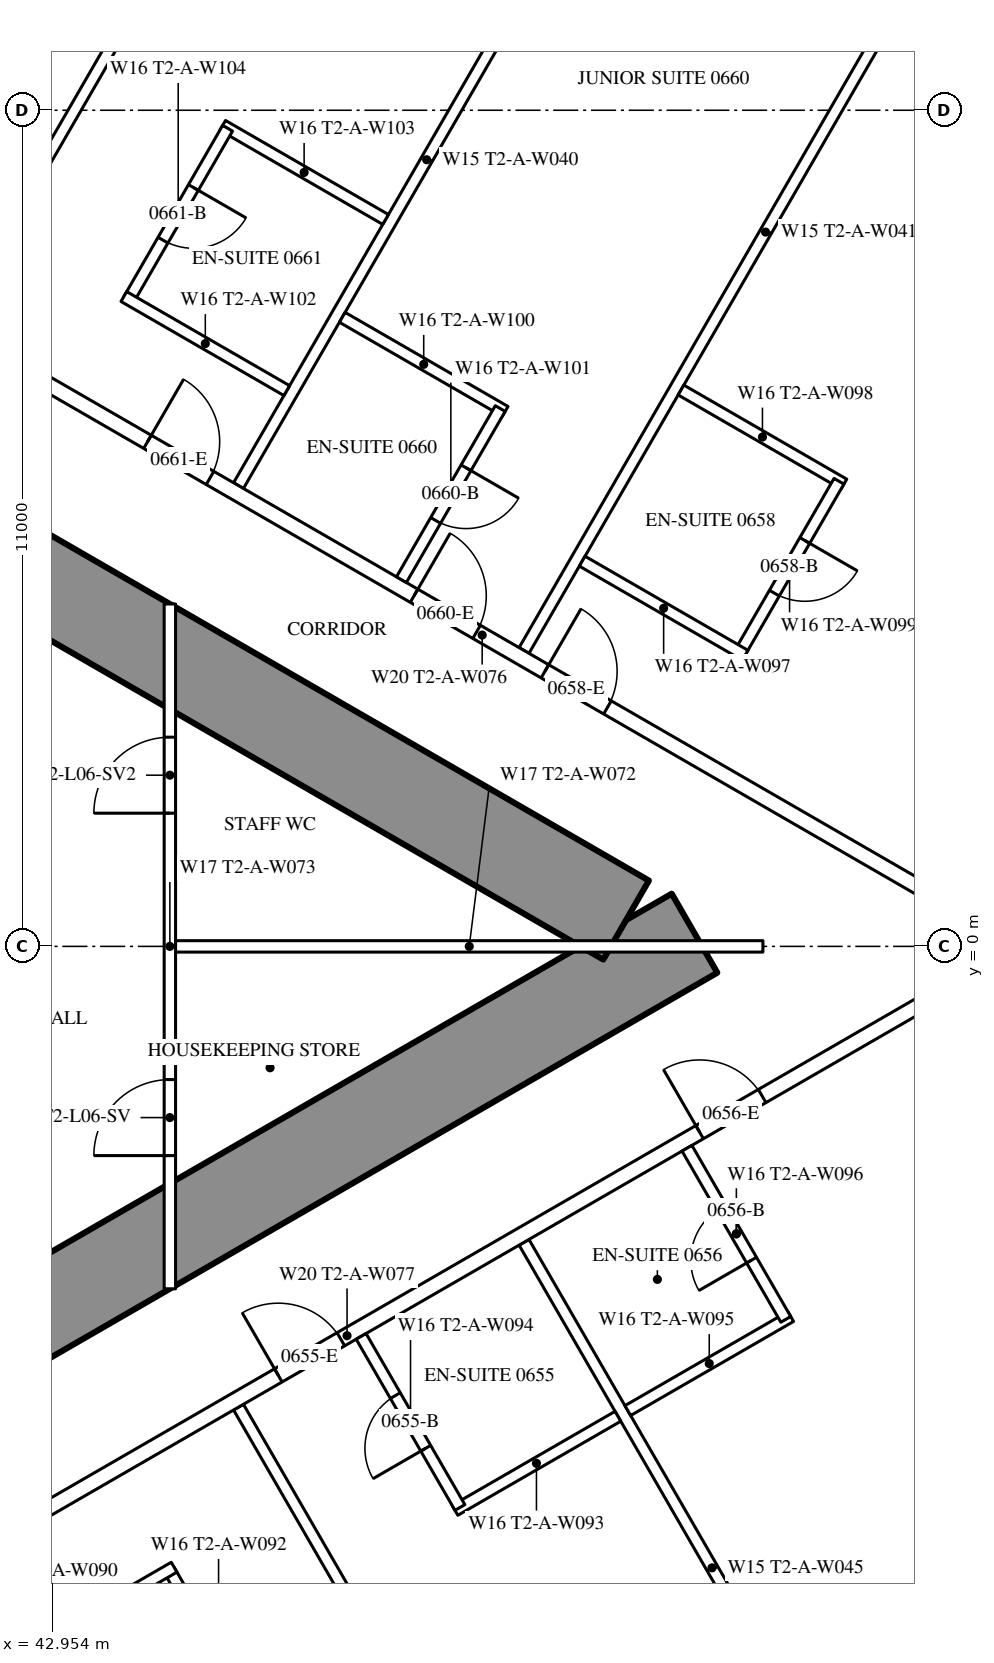
"""IFC4 building model, lengths in metres.
Left out: names, types, materials, properties, quantities, classifications, styles, units other than length and angle.
Written with IfcOpenShell. Run it as: python <this file> out.ifc"""

import sys

from ifc_helpers import new_model, si_unit, direction, frame, frame_2d, origin, place, context, subcontext, project, spatial, rectangle, extrude, element, fill, save


model = new_model("IFC4")
c1 = context("Model", 3, precision=1e-05, world=origin(), true_north=direction((0.0, 1.0)))
c2 = subcontext(c1, "Body", "Model", "MODEL_VIEW")
j1 = project(units=[si_unit("LENGTHUNIT", "METRE"), si_unit("PLANEANGLEUNIT", "RADIAN")], contexts=[c1])
p1 = place(None, origin())
s1 = spatial("IfcSite", under=j1, at=p1, CompositionType="ELEMENT")
p2 = place(p1, origin())
s2 = spatial("IfcBuilding", under=s1, at=p2, CompositionType="ELEMENT")
p3 = place(p2, frame((0.0, 0.0, 28.5)))
s3 = spatial("IfcBuildingStorey", under=s2, at=p3, CompositionType="ELEMENT", Elevation=28.5)
p4 = place(p3, frame((27.2, -13.8, 0.0), z_axis=(0.0, 0.0, 1.0), x_axis=(0.866027159892, 0.499996958321, 0.0)))
e1 = element("IfcWall", 1, at=p4, inside=s3, PredefinedType="SHEAR", context=c2, shape_type="SweptSolid", body=[
    extrude(rectangle(XDim=27.947, YDim=1.2, at=frame_2d((13.973, 0.0))), origin(), (0.0, 0.0, 1.0), 3.5),
])
p5 = place(p4, frame((4.6, 0.0, 0.0)))
e2 = element("IfcOpeningElement", 2, at=p5, cuts=e1, PredefinedType="OPENING", context=c2, shape_type="SweptSolid", body=[
    extrude(rectangle(XDim=1.0, YDim=2.2, at=frame_2d((0.5, 1.1))), frame((0.0, 0.61, 0.0), z_axis=(0.0, -1.0, 0.0), x_axis=(1.0, 0.0, 0.0)), (0.0, 0.0, 1.0), 1.22),
])
p6 = place(p4, frame((13.395, 0.0, 0.0)))
e3 = element("IfcOpeningElement", 3, at=p6, cuts=e1, PredefinedType="OPENING", context=c2, shape_type="SweptSolid", body=[
    extrude(rectangle(XDim=1.8, YDim=2.2, at=frame_2d((0.9, 1.1))), frame((0.0, 0.61, 0.0), z_axis=(0.0, -1.0, 0.0), x_axis=(1.0, 0.0, 0.0)), (0.0, 0.0, 1.0), 1.22),
])
p7 = place(p3, frame((27.2, 13.8, 0.0), z_axis=(0.0, 0.0, 1.0), x_axis=(0.866024515034, -0.500001539357, 0.0)))
e4 = element("IfcWall", 4, at=p7, inside=s3, PredefinedType="SHEAR", context=c2, shape_type="SweptSolid", body=[
    extrude(rectangle(XDim=26.907, YDim=1.2, at=frame_2d((13.454, 0.0))), origin(), (0.0, 0.0, 1.0), 3.5),
])
p8 = place(p7, frame((4.6, 0.0, 0.0)))
e5 = element("IfcOpeningElement", 5, at=p8, cuts=e4, PredefinedType="OPENING", context=c2, shape_type="SweptSolid", body=[
    extrude(rectangle(XDim=1.0, YDim=2.2, at=frame_2d((0.5, 1.1))), frame((0.0, 0.61, 0.0), z_axis=(0.0, -1.0, 0.0), x_axis=(1.0, 0.0, 0.0)), (0.0, 0.0, 1.0), 1.22),
])
p9 = place(p7, frame((13.395, 0.0, 0.0)))
e6 = element("IfcOpeningElement", 6, at=p9, cuts=e4, PredefinedType="OPENING", context=c2, shape_type="SweptSolid", body=[
    extrude(rectangle(XDim=1.8, YDim=2.2, at=frame_2d((0.9, 1.1))), frame((0.0, 0.61, 0.0), z_axis=(0.0, -1.0, 0.0), x_axis=(1.0, 0.0, 0.0)), (0.0, 0.0, 1.0), 1.22),
])
p10 = place(p3, frame((41.647, -8.23, 0.0), z_axis=(0.0, 0.0, 1.0), x_axis=(0.49998590462, -0.866033541603, 0.0)))
e7 = element("IfcWall", 7, at=p10, inside=s3, PredefinedType="PARTITIONING", context=c2, shape_type="SweptSolid", body=[
    extrude(rectangle(XDim=12.621, YDim=0.15, at=frame_2d((6.311, 0.0))), origin(), (0.0, 0.0, 1.0), 3.25),
])
p11 = place(p3, frame((45.403, -6.062, 0.0), z_axis=(0.0, 0.0, 1.0), x_axis=(0.500007077968, -0.866021317279, 0.0)))
e8 = element("IfcWall", 8, at=p11, inside=s3, PredefinedType="PARTITIONING", context=c2, shape_type="SweptSolid", body=[
    extrude(rectangle(XDim=12.721, YDim=0.15, at=frame_2d((6.361, 0.0))), origin(), (0.0, 0.0, 1.0), 3.25),
])
p12 = place(p3, frame((49.159, -3.893, 0.0), z_axis=(0.0, 0.0, 1.0), x_axis=(0.499998773722, -0.866026111775, 0.0)))
e9 = element("IfcWall", 9, at=p12, inside=s3, PredefinedType="PARTITIONING", context=c2, shape_type="SweptSolid", body=[
    extrude(rectangle(XDim=9.892, YDim=0.15, at=frame_2d((4.946, 0.0))), origin(), (0.0, 0.0, 1.0), 2.25),
])
p13 = place(p3, frame((41.647, 8.23, 0.0), z_axis=(0.0, 0.0, 1.0), x_axis=(0.49998590462, 0.866033541603, 0.0)))
e10 = element("IfcWall", 10, at=p13, inside=s3, PredefinedType="PARTITIONING", context=c2, shape_type="SweptSolid", body=[
    extrude(rectangle(XDim=12.621, YDim=0.15, at=frame_2d((6.311, 0.0))), origin(), (0.0, 0.0, 1.0), 3.25),
])
p14 = place(p3, frame((45.403, 6.062, 0.0), z_axis=(0.0, 0.0, 1.0), x_axis=(0.500013434677, 0.866017647131, 0.0)))
e11 = element("IfcWall", 11, at=p14, inside=s3, PredefinedType="PARTITIONING", context=c2, shape_type="SweptSolid", body=[
    extrude(rectangle(XDim=9.902, YDim=0.15, at=frame_2d((4.951, 0.0))), origin(), (0.0, 0.0, 1.0), 2.25),
])
p15 = place(p3, frame((49.159, 3.893, 0.0), z_axis=(0.0, 0.0, 1.0), x_axis=(0.499995664361, 0.866027906952, 0.0)))
e12 = element("IfcWall", 12, at=p15, inside=s3, PredefinedType="PARTITIONING", context=c2, shape_type="SweptSolid", body=[
    extrude(rectangle(XDim=12.711, YDim=0.15, at=frame_2d((6.356, 0.0))), origin(), (0.0, 0.0, 1.0), 3.25),
])
p16 = place(p3, frame((37.96, -10.243, 0.0), z_axis=(0.0, 0.0, 1.0), x_axis=(0.866026429433, 0.499998223521, 0.0)))
e13 = element("IfcWall", 13, at=p16, inside=s3, PredefinedType="PARTITIONING", context=c2, shape_type="SweptSolid", body=[
    extrude(rectangle(XDim=20.487, YDim=0.2, at=frame_2d((10.243, 0.0))), origin(), (0.0, 0.0, 1.0), 3.25),
])
p17 = place(p16, frame((4.575, 0.0, 0.0)))
e14 = element("IfcOpeningElement", 14, at=p17, cuts=e13, PredefinedType="OPENING", context=c2, shape_type="SweptSolid", body=[
    extrude(rectangle(XDim=0.95, YDim=2.2, at=frame_2d((0.475, 1.1))), frame((0.0, 0.11, 0.0), z_axis=(0.0, -1.0, 0.0), x_axis=(1.0, 0.0, 0.0)), (0.0, 0.0, 1.0), 0.22),
])
p18 = place(p16, frame((9.199, 0.0, 0.0)))
e15 = element("IfcOpeningElement", 15, at=p18, cuts=e13, PredefinedType="OPENING", context=c2, shape_type="SweptSolid", body=[
    extrude(rectangle(XDim=0.95, YDim=2.2, at=frame_2d((0.475, 1.1))), frame((0.0, 0.11, 0.0), z_axis=(0.0, -1.0, 0.0), x_axis=(1.0, 0.0, 0.0)), (0.0, 0.0, 1.0), 0.22),
])
p19 = place(p16, frame((15.599, 0.0, 0.0)))
e16 = element("IfcOpeningElement", 16, at=p19, cuts=e13, PredefinedType="OPENING", context=c2, shape_type="SweptSolid", body=[
    extrude(rectangle(XDim=0.95, YDim=2.2, at=frame_2d((0.475, 1.1))), frame((0.0, 0.11, 0.0), z_axis=(0.0, -1.0, 0.0), x_axis=(1.0, 0.0, 0.0)), (0.0, 0.0, 1.0), 0.22),
])
p20 = place(p16, frame((2.875, 0.0, 0.0)))
e17 = element("IfcOpeningElement", 17, at=p20, cuts=e13, PredefinedType="OPENING", context=c2, shape_type="SweptSolid", body=[
    extrude(rectangle(XDim=0.95, YDim=2.2, at=frame_2d((0.475, 1.1))), frame((0.0, 0.11, 0.0), z_axis=(0.0, -1.0, 0.0), x_axis=(1.0, 0.0, 0.0)), (0.0, 0.0, 1.0), 0.22),
])
p21 = place(p3, frame((41.619, 8.131, 0.0), z_axis=(0.0, 0.0, 1.0), x_axis=(0.86603245327, -0.499987789734, 0.0)))
e18 = element("IfcWall", 18, at=p21, inside=s3, PredefinedType="PARTITIONING", context=c2, shape_type="SweptSolid", body=[
    extrude(rectangle(XDim=16.142, YDim=0.2, at=frame_2d((8.071, 0.0))), origin(), (0.0, 0.0, 1.0), 3.25),
])
p22 = place(p21, frame((9.024, 0.0, 0.0)))
e19 = element("IfcOpeningElement", 19, at=p22, cuts=e18, PredefinedType="OPENING", context=c2, shape_type="SweptSolid", body=[
    extrude(rectangle(XDim=0.95, YDim=2.2, at=frame_2d((0.475, 1.1))), frame((0.0, 0.11, 0.0), z_axis=(0.0, -1.0, 0.0), x_axis=(1.0, 0.0, 0.0)), (0.0, 0.0, 1.0), 0.22),
])
p23 = place(p21, frame((7.037, 0.0, 0.0)))
e20 = element("IfcOpeningElement", 20, at=p23, cuts=e18, PredefinedType="OPENING", context=c2, shape_type="SweptSolid", body=[
    extrude(rectangle(XDim=0.95, YDim=2.2, at=frame_2d((0.475, 1.1))), frame((0.0, 0.11, 0.0), z_axis=(0.0, -1.0, 0.0), x_axis=(1.0, 0.0, 0.0)), (0.0, 0.0, 1.0), 0.22),
])
p24 = place(p21, frame((2.987, 0.0, 0.0)))
e21 = element("IfcOpeningElement", 21, at=p24, cuts=e18, PredefinedType="OPENING", context=c2, shape_type="SweptSolid", body=[
    extrude(rectangle(XDim=0.95, YDim=2.2, at=frame_2d((0.475, 1.1))), frame((0.0, 0.11, 0.0), z_axis=(0.0, -1.0, 0.0), x_axis=(1.0, 0.0, 0.0)), (0.0, 0.0, 1.0), 0.22),
])
p25 = place(p3, frame((44.491, -8.205, 0.0), z_axis=(0.0, 0.0, 1.0), x_axis=(0.500047596559, -0.865997922154, 0.0)))
e22 = element("IfcWall", 22, at=p25, inside=s3, PredefinedType="PARTITIONING", context=c2, shape_type="SweptSolid", body=[
    extrude(rectangle(XDim=2.6, YDim=0.15, at=frame_2d((1.3, 0.0))), origin(), (0.0, 0.0, 1.0), 3.25),
])
p26 = place(p25, frame((0.9, 0.0, 0.0)))
e23 = element("IfcOpeningElement", 23, at=p26, cuts=e22, PredefinedType="OPENING", context=c2, shape_type="SweptSolid", body=[
    extrude(rectangle(XDim=0.8, YDim=2.2, at=frame_2d((0.4, 1.1))), frame((0.0, 0.085, 0.0), z_axis=(0.0, -1.0, 0.0), x_axis=(1.0, 0.0, 0.0)), (0.0, 0.0, 1.0), 0.17),
])
for number, where, z_axis, x_axis in (
    (24, (42.412, -9.405, 0.0), (0.0, 0.0, 1.0), (0.866, 0.5, 0.0)),
    (25, (48.251, -7.42, 0.0), (0.0, 0.0, 1.0), (0.866, 0.5, 0.0)),
):
    element("IfcWall", number, at=place(p3, frame(where, z_axis=z_axis, x_axis=x_axis)), inside=s3, PredefinedType="PARTITIONING", context=c2, shape_type="SweptSolid", body=[
        extrude(rectangle(XDim=2.475, YDim=0.15, at=frame_2d((1.237, 0.0))), origin(), (0.0, 0.0, 1.0), 3.25),
    ])
p27 = place(p3, frame((47.016, -5.13, 0.0), z_axis=(0.0, 0.0, 1.0), x_axis=(0.500006934395, -0.866021400173, 0.0)))
e26 = element("IfcWall", 26, at=p27, inside=s3, PredefinedType="PARTITIONING", context=c2, shape_type="SweptSolid", body=[
    extrude(rectangle(XDim=2.6, YDim=0.15, at=frame_2d((1.3, 0.0))), origin(), (0.0, 0.0, 1.0), 3.25),
])
p28 = place(p27, frame((0.9, 0.0, 0.0)))
e27 = element("IfcOpeningElement", 27, at=p28, cuts=e26, PredefinedType="OPENING", context=c2, shape_type="SweptSolid", body=[
    extrude(rectangle(XDim=0.8, YDim=2.2, at=frame_2d((0.4, 1.1))), frame((0.0, 0.085, 0.0), z_axis=(0.0, -1.0, 0.0), x_axis=(1.0, 0.0, 0.0)), (0.0, 0.0, 1.0), 0.17),
])
p29 = place(p3, frame((50.524, -6.107, 0.0), z_axis=(0.0, 0.0, 1.0), x_axis=(0.866031185235, 0.4999899861, 0.0)))
e28 = element("IfcWall", 28, at=p29, inside=s3, PredefinedType="PARTITIONING", context=c2, shape_type="SweptSolid", body=[
    extrude(rectangle(XDim=2.475, YDim=0.15, at=frame_2d((1.238, 0.0))), origin(), (0.0, 0.0, 1.0), 3.25),
])
p30 = place(p3, frame((51.303, -2.656, 0.0), z_axis=(0.0, 0.0, 1.0), x_axis=(0.500047596559, -0.865997922154, 0.0)))
e29 = element("IfcWall", 29, at=p30, inside=s3, PredefinedType="PARTITIONING", context=c2, shape_type="SweptSolid", body=[
    extrude(rectangle(XDim=2.6, YDim=0.15, at=frame_2d((1.3, 0.0))), origin(), (0.0, 0.0, 1.0), 3.25),
])
p31 = place(p30, frame((0.9, 0.0, 0.0)))
e30 = element("IfcOpeningElement", 30, at=p31, cuts=e29, PredefinedType="OPENING", context=c2, shape_type="SweptSolid", body=[
    extrude(rectangle(XDim=0.8, YDim=2.2, at=frame_2d((0.4, 1.1))), frame((0.0, 0.085, 0.0), z_axis=(0.0, -1.0, 0.0), x_axis=(1.0, 0.0, 0.0)), (0.0, 0.0, 1.0), 0.17),
])
p32 = place(p3, frame((51.224, 7.32, 0.0), z_axis=(0.0, 0.0, 1.0), x_axis=(0.866031185235, -0.4999899861, 0.0)))
e31 = element("IfcWall", 31, at=p32, inside=s3, PredefinedType="PARTITIONING", context=c2, shape_type="SweptSolid", body=[
    extrude(rectangle(XDim=2.475, YDim=0.15, at=frame_2d((1.238, 0.0))), origin(), (0.0, 0.0, 1.0), 3.25),
])
p33 = place(p3, frame((52.003, 3.868, 0.0), z_axis=(0.0, 0.0, 1.0), x_axis=(0.500047596559, 0.865997922154, 0.0)))
e32 = element("IfcWall", 32, at=p33, inside=s3, PredefinedType="PARTITIONING", context=c2, shape_type="SweptSolid", body=[
    extrude(rectangle(XDim=2.6, YDim=0.15, at=frame_2d((1.3, 0.0))), origin(), (0.0, 0.0, 1.0), 3.25),
])
p34 = place(p33, frame((0.9, 0.0, 0.0)))
e33 = element("IfcOpeningElement", 33, at=p34, cuts=e32, PredefinedType="OPENING", context=c2, shape_type="SweptSolid", body=[
    extrude(rectangle(XDim=0.8, YDim=2.2, at=frame_2d((0.4, 1.1))), frame((0.0, 0.085, 0.0), z_axis=(0.0, -1.0, 0.0), x_axis=(1.0, 0.0, 0.0)), (0.0, 0.0, 1.0), 0.17),
])
p35 = place(p3, frame((49.925, 5.068, 0.0), z_axis=(0.0, 0.0, 1.0), x_axis=(0.866006523861, -0.500032699561, 0.0)))
e34 = element("IfcWall", 34, at=p35, inside=s3, PredefinedType="PARTITIONING", context=c2, shape_type="SweptSolid", body=[
    extrude(rectangle(XDim=2.475, YDim=0.15, at=frame_2d((1.237, 0.0))), origin(), (0.0, 0.0, 1.0), 3.25),
])
p36 = place(p3, frame((46.768, 8.276, 0.0), z_axis=(0.0, 0.0, 1.0), x_axis=(0.866031185235, -0.4999899861, 0.0)))
e35 = element("IfcWall", 35, at=p36, inside=s3, PredefinedType="PARTITIONING", context=c2, shape_type="SweptSolid", body=[
    extrude(rectangle(XDim=2.475, YDim=0.15, at=frame_2d((1.238, 0.0))), origin(), (0.0, 0.0, 1.0), 3.25),
])
p37 = place(p3, frame((47.546, 4.824, 0.0), z_axis=(0.0, 0.0, 1.0), x_axis=(0.500006934395, 0.866021400173, 0.0)))
e36 = element("IfcWall", 36, at=p37, inside=s3, PredefinedType="PARTITIONING", context=c2, shape_type="SweptSolid", body=[
    extrude(rectangle(XDim=2.6, YDim=0.15, at=frame_2d((1.3, 0.0))), origin(), (0.0, 0.0, 1.0), 3.25),
])
p38 = place(p37, frame((0.9, 0.0, 0.0)))
e37 = element("IfcOpeningElement", 37, at=p38, cuts=e36, PredefinedType="OPENING", context=c2, shape_type="SweptSolid", body=[
    extrude(rectangle(XDim=0.8, YDim=2.2, at=frame_2d((0.4, 1.1))), frame((0.0, 0.085, 0.0), z_axis=(0.0, -1.0, 0.0), x_axis=(1.0, 0.0, 0.0)), (0.0, 0.0, 1.0), 0.17),
])
p39 = place(p3, frame((45.195, 10.801, 0.0), z_axis=(0.0, 0.0, 1.0), x_axis=(0.86604923931, -0.499958713387, 0.0)))
e38 = element("IfcWall", 38, at=p39, inside=s3, PredefinedType="PARTITIONING", context=c2, shape_type="SweptSolid", body=[
    extrude(rectangle(XDim=2.475, YDim=0.15, at=frame_2d((1.237, 0.0))), origin(), (0.0, 0.0, 1.0), 3.25),
])
p40 = place(p3, frame((43.959, 8.512, 0.0), z_axis=(0.0, 0.0, 1.0), x_axis=(0.500006934395, 0.866021400173, 0.0)))
e39 = element("IfcWall", 39, at=p40, inside=s3, PredefinedType="PARTITIONING", context=c2, shape_type="SweptSolid", body=[
    extrude(rectangle(XDim=2.6, YDim=0.15, at=frame_2d((1.3, 0.0))), origin(), (0.0, 0.0, 1.0), 3.25),
])
p41 = place(p40, frame((0.9, 0.0, 0.0)))
e40 = element("IfcOpeningElement", 40, at=p41, cuts=e39, PredefinedType="OPENING", context=c2, shape_type="SweptSolid", body=[
    extrude(rectangle(XDim=0.8, YDim=2.2, at=frame_2d((0.4, 1.1))), frame((0.0, 0.085, 0.0), z_axis=(0.0, -1.0, 0.0), x_axis=(1.0, 0.0, 0.0)), (0.0, 0.0, 1.0), 0.17),
])
p42 = place(p3, frame((43.895, 8.549, 0.0), z_axis=(0.0, 0.0, 1.0), x_axis=(0.866031185235, -0.4999899861, 0.0)))
e41 = element("IfcWall", 41, at=p42, inside=s3, PredefinedType="PARTITIONING", context=c2, shape_type="SweptSolid", body=[
    extrude(rectangle(XDim=2.475, YDim=0.15, at=frame_2d((1.238, 0.0))), origin(), (0.0, 0.0, 1.0), 3.25),
])
p43 = place(p3, frame((44.5, -4.505, 0.0), z_axis=(0.0, 0.0, 1.0), x_axis=(0.0, 1.0, 0.0)))
e42 = element("IfcWall", 42, at=p43, inside=s3, PredefinedType="PARTITIONING", context=c2, shape_type="SweptSolid", body=[
    extrude(rectangle(XDim=9.009, YDim=0.15, at=frame_2d((4.505, 0.0))), origin(), (0.0, 0.0, 1.0), 2.45),
])
p44 = place(p43, frame((1.752, 0.0, 0.0)))
e43 = element("IfcOpeningElement", 43, at=p44, cuts=e42, PredefinedType="OPENING", context=c2, shape_type="SweptSolid", body=[
    extrude(rectangle(XDim=1.0, YDim=2.2, at=frame_2d((0.5, 1.1))), frame((0.0, 0.085, 0.0), z_axis=(0.0, -1.0, 0.0), x_axis=(1.0, 0.0, 0.0)), (0.0, 0.0, 1.0), 0.17),
])
p45 = place(p43, frame((6.257, 0.0, 0.0)))
e44 = element("IfcOpeningElement", 44, at=p45, cuts=e42, PredefinedType="OPENING", context=c2, shape_type="SweptSolid", body=[
    extrude(rectangle(XDim=1.0, YDim=2.2, at=frame_2d((0.5, 1.1))), frame((0.0, 0.085, 0.0), z_axis=(0.0, -1.0, 0.0), x_axis=(1.0, 0.0, 0.0)), (0.0, 0.0, 1.0), 0.17),
])
p46 = place(p3, frame((44.575, 0.0, 0.0), z_axis=(0.0, 0.0, 1.0), x_axis=(1.0, 0.0, 0.0)))
e45 = element("IfcWall", 45, at=p46, inside=s3, PredefinedType="PARTITIONING", context=c2, shape_type="SweptSolid", body=[
    extrude(rectangle(XDim=7.727, YDim=0.15, at=frame_2d((3.864, 0.0))), origin(), (0.0, 0.0, 1.0), 2.25),
])
p47 = place(p28, origin())
e46 = element("IfcDoor", 46, at=p47, inside=s3, OperationType="SINGLE_SWING_RIGHT", PredefinedType="DOOR", context=c2, shape_type="SweptSolid", body=[
    extrude(rectangle(XDim=0.8, YDim=2.2, at=frame_2d((0.4, 1.1))), frame((0.0, 0.025, 0.0), z_axis=(0.0, -1.0, 0.0), x_axis=(1.0, 0.0, 0.0)), (0.0, 0.0, 1.0), 0.05),
])
fill(e27, e46)
p48 = place(p18, origin())
e47 = element("IfcDoor", 47, at=p48, inside=s3, OperationType="SINGLE_SWING_LEFT", PredefinedType="DOOR", context=c2, shape_type="SweptSolid", body=[
    extrude(rectangle(XDim=0.95, YDim=2.2, at=frame_2d((0.475, 1.1))), frame((0.0, 0.025, 0.0), z_axis=(0.0, -1.0, 0.0), x_axis=(1.0, 0.0, 0.0)), (0.0, 0.0, 1.0), 0.05),
])
fill(e15, e47)
p49 = place(p31, origin())
e48 = element("IfcDoor", 48, at=p49, inside=s3, OperationType="SINGLE_SWING_RIGHT", PredefinedType="DOOR", context=c2, shape_type="SweptSolid", body=[
    extrude(rectangle(XDim=0.8, YDim=2.2, at=frame_2d((0.4, 1.1))), frame((0.0, 0.025, 0.0), z_axis=(0.0, -1.0, 0.0), x_axis=(1.0, 0.0, 0.0)), (0.0, 0.0, 1.0), 0.05),
])
fill(e30, e48)
p50 = place(p19, origin())
e49 = element("IfcDoor", 49, at=p50, inside=s3, OperationType="SINGLE_SWING_LEFT", PredefinedType="DOOR", context=c2, shape_type="SweptSolid", body=[
    extrude(rectangle(XDim=0.95, YDim=2.2, at=frame_2d((0.475, 1.1))), frame((0.0, 0.025, 0.0), z_axis=(0.0, -1.0, 0.0), x_axis=(1.0, 0.0, 0.0)), (0.0, 0.0, 1.0), 0.05),
])
fill(e16, e49)
p51 = place(p34, origin())
e50 = element("IfcDoor", 50, at=p51, inside=s3, OperationType="SINGLE_SWING_RIGHT", PredefinedType="DOOR", context=c2, shape_type="SweptSolid", body=[
    extrude(rectangle(XDim=0.8, YDim=2.2, at=frame_2d((0.4, 1.1))), frame((0.0, 0.025, 0.0), z_axis=(0.0, -1.0, 0.0), x_axis=(1.0, 0.0, 0.0)), (0.0, 0.0, 1.0), 0.05),
])
fill(e33, e50)
p52 = place(p22, origin())
e51 = element("IfcDoor", 51, at=p52, inside=s3, OperationType="SINGLE_SWING_LEFT", PredefinedType="DOOR", context=c2, shape_type="SweptSolid", body=[
    extrude(rectangle(XDim=0.95, YDim=2.2, at=frame_2d((0.475, 1.1))), frame((0.0, 0.025, 0.0), z_axis=(0.0, -1.0, 0.0), x_axis=(1.0, 0.0, 0.0)), (0.0, 0.0, 1.0), 0.05),
])
fill(e19, e51)
p53 = place(p38, origin())
e52 = element("IfcDoor", 52, at=p53, inside=s3, OperationType="SINGLE_SWING_RIGHT", PredefinedType="DOOR", context=c2, shape_type="SweptSolid", body=[
    extrude(rectangle(XDim=0.8, YDim=2.2, at=frame_2d((0.4, 1.1))), frame((0.0, 0.025, 0.0), z_axis=(0.0, -1.0, 0.0), x_axis=(1.0, 0.0, 0.0)), (0.0, 0.0, 1.0), 0.05),
])
fill(e37, e52)
p54 = place(p23, origin())
e53 = element("IfcDoor", 53, at=p54, inside=s3, OperationType="SINGLE_SWING_LEFT", PredefinedType="DOOR", context=c2, shape_type="SweptSolid", body=[
    extrude(rectangle(XDim=0.95, YDim=2.2, at=frame_2d((0.475, 1.1))), frame((0.0, 0.025, 0.0), z_axis=(0.0, -1.0, 0.0), x_axis=(1.0, 0.0, 0.0)), (0.0, 0.0, 1.0), 0.05),
])
fill(e20, e53)
p55 = place(p41, origin())
e54 = element("IfcDoor", 54, at=p55, inside=s3, OperationType="SINGLE_SWING_RIGHT", PredefinedType="DOOR", context=c2, shape_type="SweptSolid", body=[
    extrude(rectangle(XDim=0.8, YDim=2.2, at=frame_2d((0.4, 1.1))), frame((0.0, 0.025, 0.0), z_axis=(0.0, -1.0, 0.0), x_axis=(1.0, 0.0, 0.0)), (0.0, 0.0, 1.0), 0.05),
])
fill(e40, e54)
p56 = place(p24, origin())
e55 = element("IfcDoor", 55, at=p56, inside=s3, OperationType="SINGLE_SWING_LEFT", PredefinedType="DOOR", context=c2, shape_type="SweptSolid", body=[
    extrude(rectangle(XDim=0.95, YDim=2.2, at=frame_2d((0.475, 1.1))), frame((0.0, 0.025, 0.0), z_axis=(0.0, -1.0, 0.0), x_axis=(1.0, 0.0, 0.0)), (0.0, 0.0, 1.0), 0.05),
])
fill(e21, e55)
p57 = place(p44, origin())
e56 = element("IfcDoor", 56, at=p57, inside=s3, OperationType="SINGLE_SWING_LEFT", PredefinedType="DOOR", context=c2, shape_type="SweptSolid", body=[
    extrude(rectangle(XDim=1.0, YDim=2.2, at=frame_2d((0.5, 1.1))), frame((0.0, 0.025, 0.0), z_axis=(0.0, -1.0, 0.0), x_axis=(1.0, 0.0, 0.0)), (0.0, 0.0, 1.0), 0.05),
])
fill(e43, e56)
p58 = place(p45, origin())
e57 = element("IfcDoor", 57, at=p58, inside=s3, OperationType="SINGLE_SWING_LEFT", PredefinedType="DOOR", context=c2, shape_type="SweptSolid", body=[
    extrude(rectangle(XDim=1.0, YDim=2.2, at=frame_2d((0.5, 1.1))), frame((0.0, 0.025, 0.0), z_axis=(0.0, -1.0, 0.0), x_axis=(1.0, 0.0, 0.0)), (0.0, 0.0, 1.0), 0.05),
])
fill(e44, e57)
save(model, sys.argv[1])
